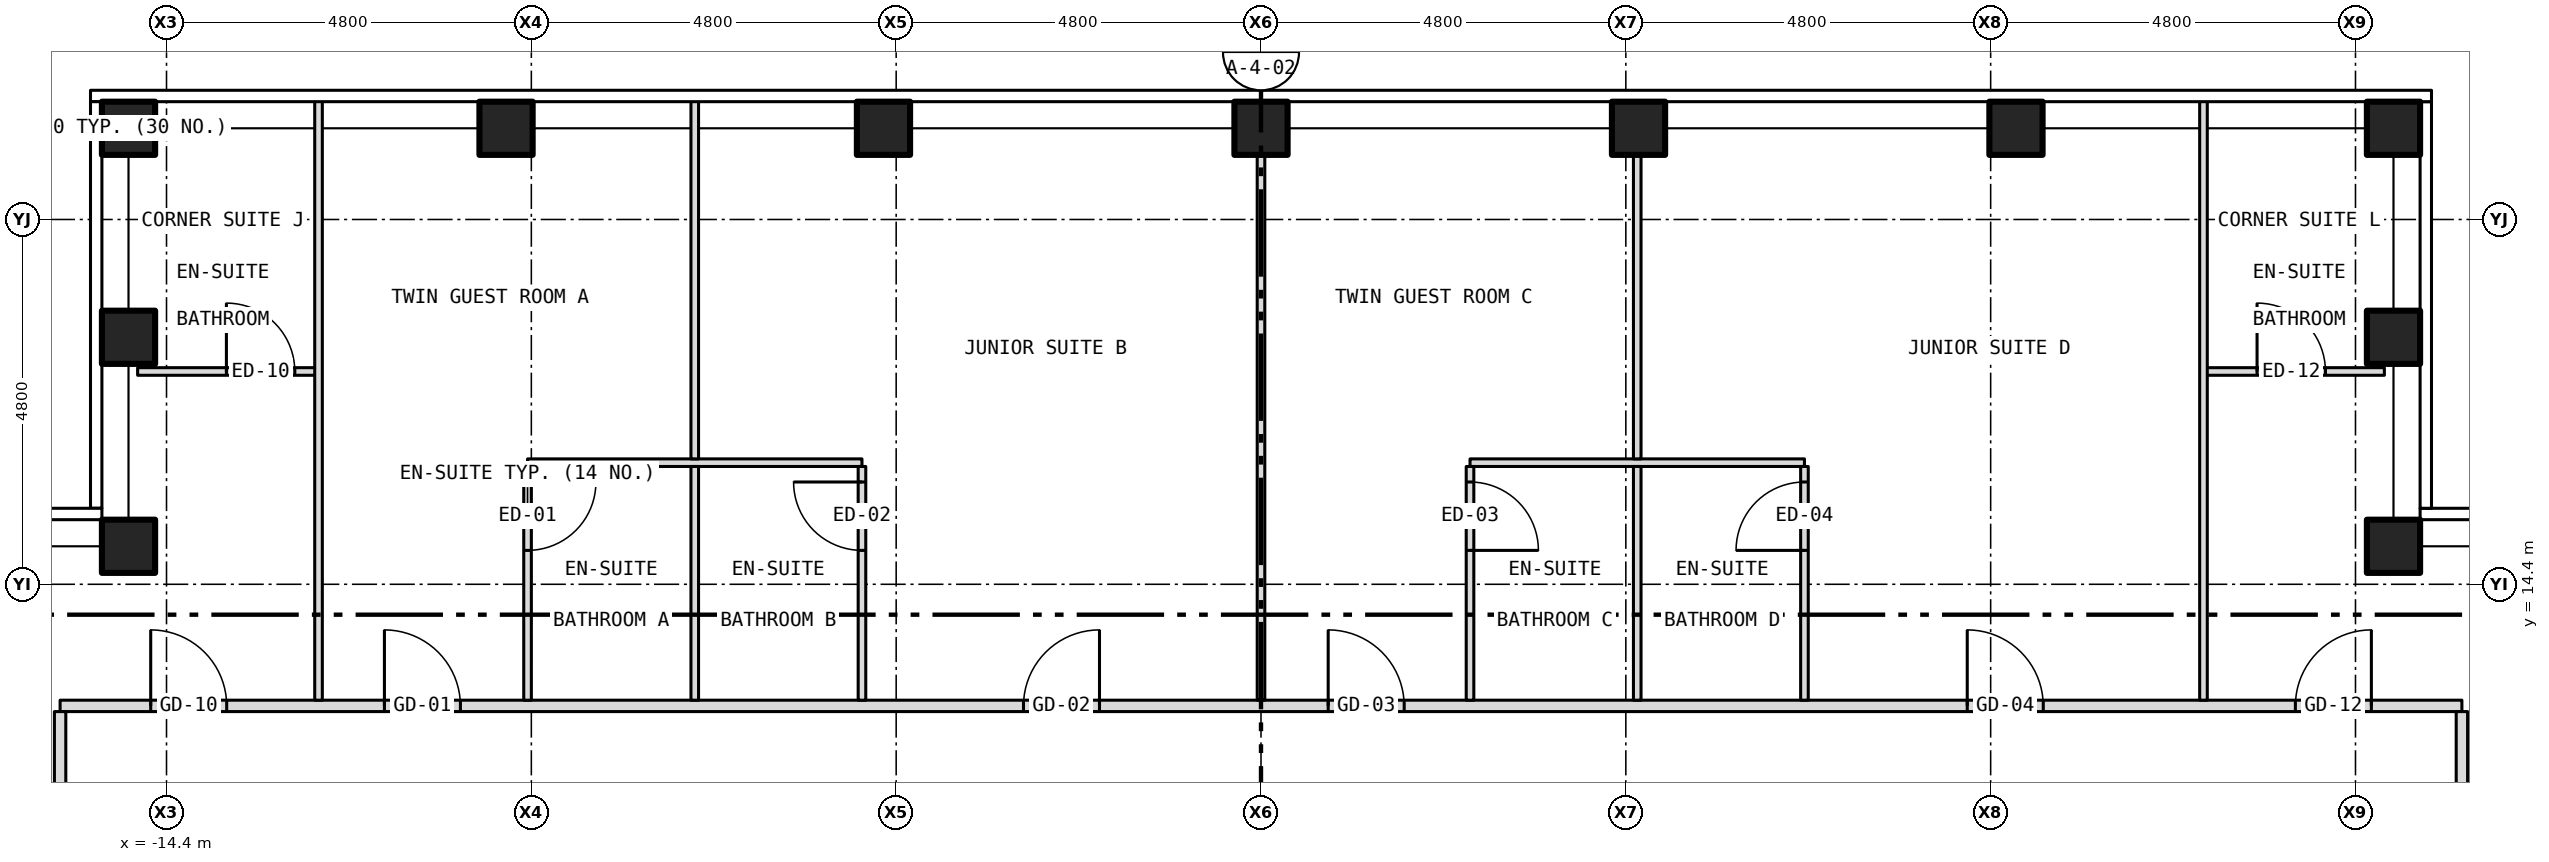
"""IFC4 building model, lengths in metres.
Left out: names, types, materials, properties, quantities, classifications, styles, units other than length and angle.
Written with IfcOpenShell. Run it as: python <this file> out.ifc"""

import sys

from ifc_helpers import new_model, si_unit, direction, frame, frame_2d, origin, origin_2d, place, context, subcontext, project, spatial, rectangle, hollow_rectangle, extrude, element, fill, save


model = new_model("IFC4")
c1 = context("Model", 3, precision=1e-05, world=origin(), true_north=direction((0.0, 1.0)))
c2 = subcontext(c1, "Body", "Model", "MODEL_VIEW")
j1 = project(units=[si_unit("LENGTHUNIT", "METRE"), si_unit("PLANEANGLEUNIT", "RADIAN")], contexts=[c1])
p1 = place(None, origin())
s1 = spatial("IfcSite", under=j1, at=p1, CompositionType="ELEMENT")
p2 = place(p1, origin())
s2 = spatial("IfcBuilding", under=s1, at=p2, CompositionType="ELEMENT")
p3 = place(p2, frame((0.0, 0.0, 198.0)))
s3 = spatial("IfcBuildingStorey", under=s2, at=p3, CompositionType="ELEMENT", Elevation=198.0)
for number, where, z_axis, x_axis in (
    (1, (-14.9, 20.4, -0.15), (0.0, 0.0, 1.0), (1.0, 0.0, 0.0)),
    (2, (-9.933, 20.4, -0.15), (0.0, 0.0, 1.0), (1.0, 0.0, 0.0)),
    (3, (-4.967, 20.4, -0.15), (0.0, 0.0, 1.0), (1.0, 0.0, 0.0)),
    (4, (0.0, 20.4, -0.15), (0.0, 0.0, 1.0), (1.0, 0.0, 0.0)),
    (5, (4.967, 20.4, -0.15), (0.0, 0.0, 1.0), (1.0, 0.0, 0.0)),
    (6, (9.933, 20.4, -0.15), (0.0, 0.0, 1.0), (1.0, 0.0, 0.0)),
    (7, (14.9, 20.4, -0.15), (0.0, 0.0, 1.0), (1.0, 0.0, 0.0)),
    (8, (-14.9, 14.9, -0.15), (0.0, 0.0, 1.0), (1.0, 0.0, 0.0)),
    (9, (-14.9, 17.65, -0.15), (0.0, 0.0, 1.0), (1.0, 0.0, 0.0)),
    (10, (14.9, 14.9, -0.15), (0.0, 0.0, 1.0), (1.0, 0.0, 0.0)),
    (11, (14.9, 17.65, -0.15), (0.0, 0.0, 1.0), (1.0, 0.0, 0.0)),
):
    element("IfcColumn", number, at=place(p3, frame(where, z_axis=z_axis, x_axis=x_axis)), inside=s3, PredefinedType="COLUMN", context=c2, shape_type="SweptSolid", body=[
        extrude(hollow_rectangle(XDim=0.7, YDim=0.7, WallThickness=0.04, at=origin_2d()), origin(), (0.0, 0.0, 1.0), 3.5),
    ])
p4 = place(p3, frame((-15.8, 12.8, 0.0), z_axis=(0.0, 0.0, 1.0), x_axis=(1.0, 0.0, 0.0)))
e12 = element("IfcWall", 12, at=p4, inside=s3, PredefinedType="PARTITIONING", context=c2, shape_type="SweptSolid", body=[
    extrude(rectangle(XDim=31.6, YDim=0.15, at=frame_2d((15.8, 0.0))), origin(), (0.0, 0.0, 1.0), 3.35),
])
p5 = place(p4, frame((4.267, 0.0, 0.0)))
e13 = element("IfcOpeningElement", 13, at=p5, cuts=e12, PredefinedType="OPENING", context=c2, shape_type="SweptSolid", body=[
    extrude(rectangle(XDim=1.0, YDim=2.1, at=frame_2d((0.5, 1.05))), frame((0.0, 0.087, 0.0), z_axis=(0.0, -1.0, 0.0), x_axis=(1.0, 0.0, 0.0)), (0.0, 0.0, 1.0), 0.174),
])
p6 = place(p4, frame((12.675, 0.0, 0.0)))
e14 = element("IfcOpeningElement", 14, at=p6, cuts=e12, PredefinedType="OPENING", context=c2, shape_type="SweptSolid", body=[
    extrude(rectangle(XDim=1.0, YDim=2.1, at=frame_2d((0.5, 1.05))), frame((0.0, 0.087, 0.0), z_axis=(0.0, -1.0, 0.0), x_axis=(1.0, 0.0, 0.0)), (0.0, 0.0, 1.0), 0.174),
])
p7 = place(p4, frame((16.684, 0.0, 0.0)))
e15 = element("IfcOpeningElement", 15, at=p7, cuts=e12, PredefinedType="OPENING", context=c2, shape_type="SweptSolid", body=[
    extrude(rectangle(XDim=1.0, YDim=2.1, at=frame_2d((0.5, 1.05))), frame((0.0, 0.087, 0.0), z_axis=(0.0, -1.0, 0.0), x_axis=(1.0, 0.0, 0.0)), (0.0, 0.0, 1.0), 0.174),
])
p8 = place(p4, frame((25.092, 0.0, 0.0)))
e16 = element("IfcOpeningElement", 16, at=p8, cuts=e12, PredefinedType="OPENING", context=c2, shape_type="SweptSolid", body=[
    extrude(rectangle(XDim=1.0, YDim=2.1, at=frame_2d((0.5, 1.05))), frame((0.0, 0.087, 0.0), z_axis=(0.0, -1.0, 0.0), x_axis=(1.0, 0.0, 0.0)), (0.0, 0.0, 1.0), 0.174),
])
p9 = place(p4, frame((1.192, 0.0, 0.0)))
e17 = element("IfcOpeningElement", 17, at=p9, cuts=e12, PredefinedType="OPENING", context=c2, shape_type="SweptSolid", body=[
    extrude(rectangle(XDim=1.0, YDim=2.1, at=frame_2d((0.5, 1.05))), frame((0.0, 0.087, 0.0), z_axis=(0.0, -1.0, 0.0), x_axis=(1.0, 0.0, 0.0)), (0.0, 0.0, 1.0), 0.174),
])
p10 = place(p4, frame((29.409, 0.0, 0.0)))
e18 = element("IfcOpeningElement", 18, at=p10, cuts=e12, PredefinedType="OPENING", context=c2, shape_type="SweptSolid", body=[
    extrude(rectangle(XDim=1.0, YDim=2.1, at=frame_2d((0.5, 1.05))), frame((0.0, 0.087, 0.0), z_axis=(0.0, -1.0, 0.0), x_axis=(1.0, 0.0, 0.0)), (0.0, 0.0, 1.0), 0.174),
])
for number, where, z_axis, x_axis in (
    (19, (-9.65, 16.0, 0.0), (0.0, 0.0, 1.0), (1.0, 0.0, 0.0)),
    (20, (2.75, 16.0, 0.0), (0.0, 0.0, 1.0), (1.0, 0.0, 0.0)),
):
    element("IfcWall", number, at=place(p3, frame(where, z_axis=z_axis, x_axis=x_axis)), inside=s3, PredefinedType="PARTITIONING", context=c2, shape_type="SweptSolid", body=[
        extrude(rectangle(XDim=4.4, YDim=0.1, at=frame_2d((2.2, 0.0))), origin(), (0.0, 0.0, 1.0), 3.35),
    ])
p11 = place(p3, frame((-14.78, 17.2, 0.0), z_axis=(0.0, 0.0, 1.0), x_axis=(1.0, 0.0, 0.0)))
e21 = element("IfcWall", 21, at=p11, inside=s3, PredefinedType="PARTITIONING", context=c2, shape_type="SweptSolid", body=[
    extrude(rectangle(XDim=2.38, YDim=0.1, at=frame_2d((1.19, 0.0))), origin(), (0.0, 0.0, 1.0), 3.35),
])
p12 = place(p11, frame((1.168, 0.0, 0.0)))
e22 = element("IfcOpeningElement", 22, at=p12, cuts=e21, PredefinedType="OPENING", context=c2, shape_type="SweptSolid", body=[
    extrude(rectangle(XDim=0.9, YDim=2.1, at=frame_2d((0.45, 1.05))), frame((0.0, 0.062, 0.0), z_axis=(0.0, -1.0, 0.0), x_axis=(1.0, 0.0, 0.0)), (0.0, 0.0, 1.0), 0.124),
])
p13 = place(p3, frame((12.4, 17.2, 0.0), z_axis=(0.0, 0.0, 1.0), x_axis=(1.0, 0.0, 0.0)))
e23 = element("IfcWall", 23, at=p13, inside=s3, PredefinedType="PARTITIONING", context=c2, shape_type="SweptSolid", body=[
    extrude(rectangle(XDim=2.38, YDim=0.1, at=frame_2d((1.19, 0.0))), origin(), (0.0, 0.0, 1.0), 3.35),
])
p14 = place(p13, frame((0.705, 0.0, 0.0)))
e24 = element("IfcOpeningElement", 24, at=p14, cuts=e23, PredefinedType="OPENING", context=c2, shape_type="SweptSolid", body=[
    extrude(rectangle(XDim=0.9, YDim=2.1, at=frame_2d((0.45, 1.05))), frame((0.0, 0.062, 0.0), z_axis=(0.0, -1.0, 0.0), x_axis=(1.0, 0.0, 0.0)), (0.0, 0.0, 1.0), 0.124),
])
p15 = place(p3, frame((-15.8, 10.92, 0.0), z_axis=(0.0, 0.0, 1.0), x_axis=(0.0, 1.0, 0.0)))
e25 = element("IfcWall", 25, at=p15, inside=s3, PredefinedType="PARTITIONING", context=c2, shape_type="SweptSolid", body=[
    extrude(rectangle(XDim=1.805, YDim=0.15, at=frame_2d((0.903, 0.0))), origin(), (0.0, 0.0, 1.0), 3.35),
])
p16 = place(p3, frame((-12.4, 12.875, 0.0), z_axis=(0.0, 0.0, 1.0), x_axis=(0.0, 1.0, 0.0)))
e26 = element("IfcWall", 26, at=p16, inside=s3, PredefinedType="PARTITIONING", context=c2, shape_type="SweptSolid", body=[
    extrude(rectangle(XDim=7.905, YDim=0.1, at=frame_2d((3.953, 0.0))), origin(), (0.0, 0.0, 1.0), 3.35),
])
p17 = place(p3, frame((-9.65, 12.875, 0.0), z_axis=(0.0, 0.0, 1.0), x_axis=(0.0, 1.0, 0.0)))
e27 = element("IfcWall", 27, at=p17, inside=s3, PredefinedType="PARTITIONING", context=c2, shape_type="SweptSolid", body=[
    extrude(rectangle(XDim=3.075, YDim=0.1, at=frame_2d((1.538, 0.0))), origin(), (0.0, 0.0, 1.0), 2.728),
])
p18 = place(p17, frame((1.971, 0.0, 0.0)))
e28 = element("IfcOpeningElement", 28, at=p18, cuts=e27, PredefinedType="OPENING", context=c2, shape_type="SweptSolid", body=[
    extrude(rectangle(XDim=0.9, YDim=2.1, at=frame_2d((0.45, 1.05))), frame((0.0, 0.062, 0.0), z_axis=(0.0, -1.0, 0.0), x_axis=(1.0, 0.0, 0.0)), (0.0, 0.0, 1.0), 0.124),
])
p19 = place(p3, frame((-7.45, 12.875, 0.0), z_axis=(0.0, 0.0, 1.0), x_axis=(0.0, 1.0, 0.0)))
e29 = element("IfcWall", 29, at=p19, inside=s3, PredefinedType="PARTITIONING", context=c2, shape_type="SweptSolid", body=[
    extrude(rectangle(XDim=3.075, YDim=0.1, at=frame_2d((1.538, 0.0))), origin(), (0.0, 0.0, 1.0), 3.35),
])
p20 = place(p3, frame((-7.45, 16.05, 0.0), z_axis=(0.0, 0.0, 1.0), x_axis=(0.0, 1.0, 0.0)))
e30 = element("IfcWall", 30, at=p20, inside=s3, PredefinedType="PARTITIONING", context=c2, shape_type="SweptSolid", body=[
    extrude(rectangle(XDim=4.73, YDim=0.1, at=frame_2d((2.365, 0.0))), origin(), (0.0, 0.0, 1.0), 3.35),
])
p21 = place(p3, frame((-5.25, 12.875, 0.0), z_axis=(0.0, 0.0, 1.0), x_axis=(0.0, 1.0, 0.0)))
e31 = element("IfcWall", 31, at=p21, inside=s3, PredefinedType="PARTITIONING", context=c2, shape_type="SweptSolid", body=[
    extrude(rectangle(XDim=3.075, YDim=0.1, at=frame_2d((1.538, 0.0))), origin(), (0.0, 0.0, 1.0), 3.35),
])
p22 = place(p21, frame((1.971, 0.0, 0.0)))
e32 = element("IfcOpeningElement", 32, at=p22, cuts=e31, PredefinedType="OPENING", context=c2, shape_type="SweptSolid", body=[
    extrude(rectangle(XDim=0.9, YDim=2.1, at=frame_2d((0.45, 1.05))), frame((0.0, 0.062, 0.0), z_axis=(0.0, -1.0, 0.0), x_axis=(1.0, 0.0, 0.0)), (0.0, 0.0, 1.0), 0.124),
])
p23 = place(p3, frame((0.0, 12.875, 0.0), z_axis=(0.0, 0.0, 1.0), x_axis=(0.0, 1.0, 0.0)))
e33 = element("IfcWall", 33, at=p23, inside=s3, PredefinedType="PARTITIONING", context=c2, shape_type="SweptSolid", body=[
    extrude(rectangle(XDim=7.405, YDim=0.1, at=frame_2d((3.703, 0.0))), origin(), (0.0, 0.0, 1.0), 2.728),
])
p24 = place(p3, frame((2.75, 12.875, 0.0), z_axis=(0.0, 0.0, 1.0), x_axis=(0.0, 1.0, 0.0)))
e34 = element("IfcWall", 34, at=p24, inside=s3, PredefinedType="PARTITIONING", context=c2, shape_type="SweptSolid", body=[
    extrude(rectangle(XDim=3.075, YDim=0.1, at=frame_2d((1.538, 0.0))), origin(), (0.0, 0.0, 1.0), 3.35),
])
p25 = place(p24, frame((1.971, 0.0, 0.0)))
e35 = element("IfcOpeningElement", 35, at=p25, cuts=e34, PredefinedType="OPENING", context=c2, shape_type="SweptSolid", body=[
    extrude(rectangle(XDim=0.9, YDim=2.1, at=frame_2d((0.45, 1.05))), frame((0.0, 0.062, 0.0), z_axis=(0.0, -1.0, 0.0), x_axis=(1.0, 0.0, 0.0)), (0.0, 0.0, 1.0), 0.124),
])
p26 = place(p3, frame((4.95, 12.875, 0.0), z_axis=(0.0, 0.0, 1.0), x_axis=(0.0, 1.0, 0.0)))
e36 = element("IfcWall", 36, at=p26, inside=s3, PredefinedType="PARTITIONING", context=c2, shape_type="SweptSolid", body=[
    extrude(rectangle(XDim=3.075, YDim=0.1, at=frame_2d((1.538, 0.0))), origin(), (0.0, 0.0, 1.0), 2.817),
])
p27 = place(p3, frame((4.95, 16.05, 0.0), z_axis=(0.0, 0.0, 1.0), x_axis=(0.0, 1.0, 0.0)))
e37 = element("IfcWall", 37, at=p27, inside=s3, PredefinedType="PARTITIONING", context=c2, shape_type="SweptSolid", body=[
    extrude(rectangle(XDim=4.23, YDim=0.1, at=frame_2d((2.115, 0.0))), origin(), (0.0, 0.0, 1.0), 2.817),
])
p28 = place(p3, frame((7.15, 12.875, 0.0), z_axis=(0.0, 0.0, 1.0), x_axis=(0.0, 1.0, 0.0)))
e38 = element("IfcWall", 38, at=p28, inside=s3, PredefinedType="PARTITIONING", context=c2, shape_type="SweptSolid", body=[
    extrude(rectangle(XDim=3.075, YDim=0.1, at=frame_2d((1.538, 0.0))), origin(), (0.0, 0.0, 1.0), 3.35),
])
p29 = place(p28, frame((1.971, 0.0, 0.0)))
e39 = element("IfcOpeningElement", 39, at=p29, cuts=e38, PredefinedType="OPENING", context=c2, shape_type="SweptSolid", body=[
    extrude(rectangle(XDim=0.9, YDim=2.1, at=frame_2d((0.45, 1.05))), frame((0.0, 0.062, 0.0), z_axis=(0.0, -1.0, 0.0), x_axis=(1.0, 0.0, 0.0)), (0.0, 0.0, 1.0), 0.124),
])
p30 = place(p3, frame((12.4, 12.875, 0.0), z_axis=(0.0, 0.0, 1.0), x_axis=(0.0, 1.0, 0.0)))
e40 = element("IfcWall", 40, at=p30, inside=s3, PredefinedType="PARTITIONING", context=c2, shape_type="SweptSolid", body=[
    extrude(rectangle(XDim=7.905, YDim=0.1, at=frame_2d((3.953, 0.0))), origin(), (0.0, 0.0, 1.0), 3.35),
])
p31 = place(p3, frame((15.8, 10.92, 0.0), z_axis=(0.0, 0.0, 1.0), x_axis=(0.0, 1.0, 0.0)))
e41 = element("IfcWall", 41, at=p31, inside=s3, PredefinedType="PARTITIONING", context=c2, shape_type="SweptSolid", body=[
    extrude(rectangle(XDim=1.805, YDim=0.15, at=frame_2d((0.903, 0.0))), origin(), (0.0, 0.0, 1.0), 3.35),
])
p32 = place(p5, origin())
e42 = element("IfcDoor", 42, at=p32, inside=s3, OperationType="SINGLE_SWING_LEFT", PredefinedType="DOOR", context=c2, shape_type="SweptSolid", body=[
    extrude(rectangle(XDim=1.0, YDim=2.1, at=frame_2d((0.5, 1.05))), frame((0.0, 0.025, 0.0), z_axis=(0.0, -1.0, 0.0), x_axis=(1.0, 0.0, 0.0)), (0.0, 0.0, 1.0), 0.05),
])
fill(e13, e42)
p33 = place(p18, origin())
e43 = element("IfcDoor", 43, at=p33, inside=s3, OperationType="SINGLE_SWING_RIGHT", PredefinedType="DOOR", context=c2, shape_type="SweptSolid", body=[
    extrude(rectangle(XDim=0.9, YDim=2.1, at=frame_2d((0.45, 1.05))), frame((0.0, 0.025, 0.0), z_axis=(0.0, -1.0, 0.0), x_axis=(1.0, 0.0, 0.0)), (0.0, 0.0, 1.0), 0.05),
])
fill(e28, e43)
p34 = place(p6, origin())
e44 = element("IfcDoor", 44, at=p34, inside=s3, OperationType="SINGLE_SWING_RIGHT", PredefinedType="DOOR", context=c2, shape_type="SweptSolid", body=[
    extrude(rectangle(XDim=1.0, YDim=2.1, at=frame_2d((0.5, 1.05))), frame((0.0, 0.025, 0.0), z_axis=(0.0, -1.0, 0.0), x_axis=(1.0, 0.0, 0.0)), (0.0, 0.0, 1.0), 0.05),
])
fill(e14, e44)
p35 = place(p22, origin())
e45 = element("IfcDoor", 45, at=p35, inside=s3, OperationType="SINGLE_SWING_RIGHT", PredefinedType="DOOR", context=c2, shape_type="SweptSolid", body=[
    extrude(rectangle(XDim=0.9, YDim=2.1, at=frame_2d((0.45, 1.05))), frame((0.0, 0.025, 0.0), z_axis=(0.0, -1.0, 0.0), x_axis=(1.0, 0.0, 0.0)), (0.0, 0.0, 1.0), 0.05),
])
fill(e32, e45)
p36 = place(p7, origin())
e46 = element("IfcDoor", 46, at=p36, inside=s3, OperationType="SINGLE_SWING_LEFT", PredefinedType="DOOR", context=c2, shape_type="SweptSolid", body=[
    extrude(rectangle(XDim=1.0, YDim=2.1, at=frame_2d((0.5, 1.05))), frame((0.0, 0.025, 0.0), z_axis=(0.0, -1.0, 0.0), x_axis=(1.0, 0.0, 0.0)), (0.0, 0.0, 1.0), 0.05),
])
fill(e15, e46)
p37 = place(p25, origin())
e47 = element("IfcDoor", 47, at=p37, inside=s3, OperationType="SINGLE_SWING_LEFT", PredefinedType="DOOR", context=c2, shape_type="SweptSolid", body=[
    extrude(rectangle(XDim=0.9, YDim=2.1, at=frame_2d((0.45, 1.05))), frame((0.0, 0.025, 0.0), z_axis=(0.0, -1.0, 0.0), x_axis=(1.0, 0.0, 0.0)), (0.0, 0.0, 1.0), 0.05),
])
fill(e35, e47)
p38 = place(p8, origin())
e48 = element("IfcDoor", 48, at=p38, inside=s3, OperationType="SINGLE_SWING_LEFT", PredefinedType="DOOR", context=c2, shape_type="SweptSolid", body=[
    extrude(rectangle(XDim=1.0, YDim=2.1, at=frame_2d((0.5, 1.05))), frame((0.0, 0.025, 0.0), z_axis=(0.0, -1.0, 0.0), x_axis=(1.0, 0.0, 0.0)), (0.0, 0.0, 1.0), 0.05),
])
fill(e16, e48)
p39 = place(p29, origin())
e49 = element("IfcDoor", 49, at=p39, inside=s3, OperationType="SINGLE_SWING_LEFT", PredefinedType="DOOR", context=c2, shape_type="SweptSolid", body=[
    extrude(rectangle(XDim=0.9, YDim=2.1, at=frame_2d((0.45, 1.05))), frame((0.0, 0.025, 0.0), z_axis=(0.0, -1.0, 0.0), x_axis=(1.0, 0.0, 0.0)), (0.0, 0.0, 1.0), 0.05),
])
fill(e39, e49)
p40 = place(p12, origin())
e50 = element("IfcDoor", 50, at=p40, inside=s3, OperationType="SINGLE_SWING_LEFT", PredefinedType="DOOR", context=c2, shape_type="SweptSolid", body=[
    extrude(rectangle(XDim=0.9, YDim=2.1, at=frame_2d((0.45, 1.05))), frame((0.0, 0.025, 0.0), z_axis=(0.0, -1.0, 0.0), x_axis=(1.0, 0.0, 0.0)), (0.0, 0.0, 1.0), 0.05),
])
fill(e22, e50)
p41 = place(p9, origin())
e51 = element("IfcDoor", 51, at=p41, inside=s3, OperationType="SINGLE_SWING_LEFT", PredefinedType="DOOR", context=c2, shape_type="SweptSolid", body=[
    extrude(rectangle(XDim=1.0, YDim=2.1, at=frame_2d((0.5, 1.05))), frame((0.0, 0.025, 0.0), z_axis=(0.0, -1.0, 0.0), x_axis=(1.0, 0.0, 0.0)), (0.0, 0.0, 1.0), 0.05),
])
fill(e17, e51)
p42 = place(p14, origin())
e52 = element("IfcDoor", 52, at=p42, inside=s3, OperationType="SINGLE_SWING_LEFT", PredefinedType="DOOR", context=c2, shape_type="SweptSolid", body=[
    extrude(rectangle(XDim=0.9, YDim=2.1, at=frame_2d((0.45, 1.05))), frame((0.0, 0.025, 0.0), z_axis=(0.0, -1.0, 0.0), x_axis=(1.0, 0.0, 0.0)), (0.0, 0.0, 1.0), 0.05),
])
fill(e24, e52)
p43 = place(p10, origin())
e53 = element("IfcDoor", 53, at=p43, inside=s3, OperationType="SINGLE_SWING_RIGHT", PredefinedType="DOOR", context=c2, shape_type="SweptSolid", body=[
    extrude(rectangle(XDim=1.0, YDim=2.1, at=frame_2d((0.5, 1.05))), frame((0.0, 0.025, 0.0), z_axis=(0.0, -1.0, 0.0), x_axis=(1.0, 0.0, 0.0)), (0.0, 0.0, 1.0), 0.05),
])
fill(e18, e53)
save(model, sys.argv[1])
